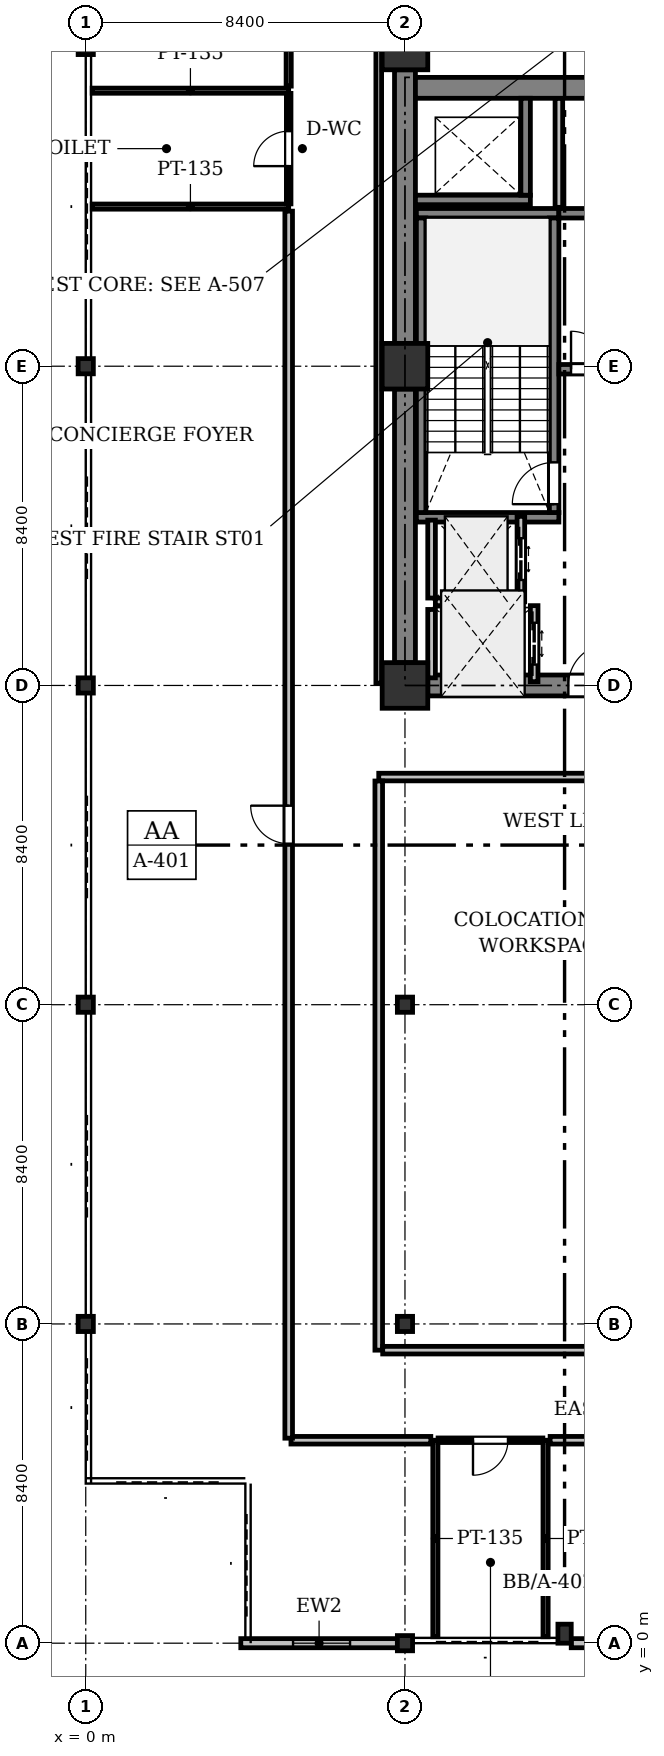
"""IFC4 building model, lengths in metres.
Left out: names, types, materials, properties, quantities, classifications, styles, units other than length and angle.
Written with IfcOpenShell. Run it as: python <this file> out.ifc"""

import sys

from ifc_helpers import new_model, si_unit, direction, frame, frame_2d, origin, origin_2d, place, context, subcontext, project, spatial, rectangle, i_section, extrude, element, fill, save


model = new_model("IFC4")
c1 = context("Model", 3, precision=1e-05, world=origin(), true_north=direction((0.0, 1.0)))
c2 = subcontext(c1, "Body", "Model", "MODEL_VIEW")
j1 = project(units=[si_unit("LENGTHUNIT", "METRE"), si_unit("PLANEANGLEUNIT", "RADIAN")], contexts=[c1])
p1 = place(None, origin())
s1 = spatial("IfcSite", under=j1, at=p1, CompositionType="ELEMENT")
p2 = place(p1, origin())
s2 = spatial("IfcBuilding", under=s1, at=p2, CompositionType="ELEMENT")
p3 = place(p2, frame((0.0, 0.0, 113.1)))
s3 = spatial("IfcBuildingStorey", under=s2, at=p3, CompositionType="ELEMENT", Elevation=113.1)
for number, where, z_axis, x_axis in (
    (1, (0.0, 8.4, 0.0), (0.0, 0.0, 1.0), (1.0, 0.0, 0.0)),
    (2, (0.0, 16.8, 0.0), (0.0, 0.0, 1.0), (1.0, 0.0, 0.0)),
    (3, (0.0, 25.2, 0.0), (0.0, 0.0, 1.0), (1.0, 0.0, 0.0)),
    (4, (0.0, 33.6, 0.0), (0.0, 0.0, 1.0), (1.0, 0.0, 0.0)),
    (5, (0.0, 42.0, 0.0), (0.0, 0.0, 1.0), (1.0, 0.0, 0.0)),
    (6, (8.4, 0.0, 0.0), (0.0, 0.0, 1.0), (1.0, 0.0, 0.0)),
    (7, (8.4, 8.4, 0.0), (0.0, 0.0, 1.0), (1.0, 0.0, 0.0)),
    (8, (8.4, 16.8, 0.0), (0.0, 0.0, 1.0), (1.0, 0.0, 0.0)),
):
    element("IfcColumn", number, at=place(p3, frame(where, z_axis=z_axis, x_axis=x_axis)), inside=s3, PredefinedType="COLUMN", context=c2, shape_type="SweptSolid", body=[
        extrude(i_section(OverallWidth=0.4, OverallDepth=0.4, WebThickness=0.025, FlangeThickness=0.04, at=origin_2d()), origin(), (0.0, 0.0, 1.0), 4.1),
    ])
for number, where, z_axis, x_axis in (
    (9, (8.4, 25.2, 0.0), (0.0, 0.0, 1.0), (1.0, 0.0, 0.0)),
    (10, (8.4, 33.6, 0.0), (0.0, 0.0, 1.0), (1.0, 0.0, 0.0)),
    (11, (8.4, 42.0, 0.0), (0.0, 0.0, 1.0), (1.0, 0.0, 0.0)),
):
    element("IfcColumn", number, at=place(p3, frame(where, z_axis=z_axis, x_axis=x_axis)), inside=s3, PredefinedType="COLUMN", context=c2, shape_type="SweptSolid", body=[
        extrude(rectangle(XDim=1.2, YDim=1.2, at=origin_2d()), origin(), (0.0, 0.0, 1.0), 4.1),
    ])
p4 = place(p3, frame((12.6, 0.25, 0.0), z_axis=(0.0, 0.0, 1.0), x_axis=(1.0, 0.0, 0.0)))
e12 = element("IfcColumn", 12, at=p4, inside=s3, PredefinedType="PILASTER", context=c2, shape_type="SweptSolid", body=[
    extrude(rectangle(XDim=0.35, YDim=0.5, at=origin_2d()), origin(), (0.0, 0.0, 1.0), 4.1),
])
p5 = place(p3, frame((16.6, 0.0, 0.0), z_axis=(0.0, 0.0, 1.0), x_axis=(-1.0, 0.0, 0.0)))
e13 = element("IfcWall", 13, at=p5, inside=s3, PredefinedType="STANDARD", context=c2, shape_type="SweptSolid", body=[
    extrude(rectangle(XDim=3.825, YDim=0.24, at=frame_2d((1.913, 0.0))), origin(), (0.0, 0.0, 1.0), 3.422),
])
p6 = place(p5, frame((1.163, 0.0, 0.9)))
e14 = element("IfcOpeningElement", 14, at=p6, cuts=e13, PredefinedType="OPENING", context=c2, shape_type="SweptSolid", body=[
    extrude(rectangle(XDim=1.5, YDim=1.6, at=frame_2d((0.75, 0.8))), frame((0.0, 0.13, 0.0), z_axis=(0.0, -1.0, 0.0), x_axis=(1.0, 0.0, 0.0)), (0.0, 0.0, 1.0), 0.26),
])
p7 = place(p3, frame((8.2, 0.0, 0.0), z_axis=(0.0, 0.0, 1.0), x_axis=(-1.0, 0.0, 0.0)))
e15 = element("IfcWall", 15, at=p7, inside=s3, PredefinedType="STANDARD", context=c2, shape_type="SweptSolid", body=[
    extrude(rectangle(XDim=4.12, YDim=0.24, at=frame_2d((2.06, 0.0))), origin(), (0.0, 0.0, 1.0), 3.825),
])
p8 = place(p7, frame((1.245, 0.0, 0.9)))
e16 = element("IfcOpeningElement", 16, at=p8, cuts=e15, PredefinedType="OPENING", context=c2, shape_type="SweptSolid", body=[
    extrude(rectangle(XDim=1.5, YDim=1.6, at=frame_2d((0.75, 0.8))), frame((0.0, 0.13, 0.0), z_axis=(0.0, -1.0, 0.0), x_axis=(1.0, 0.0, 0.0)), (0.0, 0.0, 1.0), 0.26),
])
for number, where, z_axis, x_axis in (
    (17, (8.4, 25.8, 0.0), (0.0, 0.0, 1.0), (0.0, 1.0, 0.0)),
    (18, (8.4, 34.2, 0.0), (0.0, 0.0, 1.0), (0.0, 1.0, 0.0)),
):
    element("IfcWall", number, at=place(p3, frame(where, z_axis=z_axis, x_axis=x_axis)), inside=s3, PredefinedType="SHEAR", context=c2, shape_type="SweptSolid", body=[
        extrude(rectangle(XDim=7.2, YDim=0.55, at=frame_2d((3.6, 0.0))), origin(), (0.0, 0.0, 1.0), 3.825),
    ])
p9 = place(p3, frame((8.675, 40.925, 0.0), z_axis=(0.0, 0.0, 1.0), x_axis=(1.0, 0.0, 0.0)))
e19 = element("IfcWall", 19, at=p9, inside=s3, PredefinedType="SHEAR", context=c2, shape_type="SweptSolid", body=[
    extrude(rectangle(XDim=7.85, YDim=0.55, at=frame_2d((3.925, 0.0))), origin(), (0.0, 0.0, 1.0), 3.825),
])
p10 = place(p3, frame((9.0, 25.2, 0.0), z_axis=(0.0, 0.0, 1.0), x_axis=(1.0, 0.0, 0.0)))
e20 = element("IfcWall", 20, at=p10, inside=s3, PredefinedType="SHEAR", context=c2, shape_type="SweptSolid", body=[
    extrude(rectangle(XDim=7.2, YDim=0.55, at=frame_2d((3.6, 0.0))), origin(), (0.0, 0.0, 1.0), 3.825),
])
p11 = place(p10, frame((3.7, 0.0, 0.0)))
e21 = element("IfcOpeningElement", 21, at=p11, cuts=e20, PredefinedType="OPENING", context=c2, shape_type="SweptSolid", body=[
    extrude(rectangle(XDim=1.1, YDim=2.15, at=frame_2d((0.55, 1.075))), frame((0.0, 0.285, 0.0), z_axis=(0.0, -1.0, 0.0), x_axis=(1.0, 0.0, 0.0)), (0.0, 0.0, 1.0), 0.57),
])
for number, where, z_axis, x_axis in (
    (22, (12.45, 29.625, 0.0), (0.0, 0.0, 1.0), (-1.0, 0.0, 0.0)),
    (23, (12.45, 37.625, 0.0), (0.0, 0.0, 1.0), (-1.0, 0.0, 0.0)),
):
    element("IfcWall", number, at=place(p3, frame(where, z_axis=z_axis, x_axis=x_axis)), inside=s3, PredefinedType="SHEAR", context=c2, shape_type="SweptSolid", body=[
        extrude(rectangle(XDim=3.75, YDim=0.25, at=frame_2d((1.875, 0.0))), origin(), (0.0, 0.0, 1.0), 3.825),
    ])
p12 = place(p3, frame((12.325, 29.75, 0.0), z_axis=(0.0, 0.0, 1.0), x_axis=(0.0, 1.0, 0.0)))
e24 = element("IfcWall", 24, at=p12, inside=s3, PredefinedType="SHEAR", context=c2, shape_type="SweptSolid", body=[
    extrude(rectangle(XDim=7.75, YDim=0.25, at=frame_2d((3.875, 0.0))), origin(), (0.0, 0.0, 1.0), 3.825),
])
p13 = place(p12, frame((0.22, 0.0, 0.0)))
e25 = element("IfcOpeningElement", 25, at=p13, cuts=e24, PredefinedType="OPENING", context=c2, shape_type="SweptSolid", body=[
    extrude(rectangle(XDim=1.1, YDim=2.15, at=frame_2d((0.55, 1.075))), frame((0.0, 0.135, 0.0), z_axis=(0.0, -1.0, 0.0), x_axis=(1.0, 0.0, 0.0)), (0.0, 0.0, 1.0), 0.27),
])
p14 = place(p3, frame((8.825, 29.75, 0.0), z_axis=(0.0, 0.0, 1.0), x_axis=(0.0, 1.0, 0.0)))
e26 = element("IfcWall", 26, at=p14, inside=s3, PredefinedType="SHEAR", context=c2, shape_type="SweptSolid", body=[
    extrude(rectangle(XDim=7.75, YDim=0.25, at=frame_2d((3.875, 0.0))), origin(), (0.0, 0.0, 1.0), 3.825),
])
p15 = place(p3, frame((8.675, 37.975, 0.0), z_axis=(0.0, 0.0, 1.0), x_axis=(1.0, 0.0, 0.0)))
e27 = element("IfcWall", 27, at=p15, inside=s3, PredefinedType="SHEAR", context=c2, shape_type="SweptSolid", body=[
    extrude(rectangle(XDim=3.025, YDim=0.25, at=frame_2d((1.512, 0.0))), origin(), (0.0, 0.0, 1.0), 3.825),
])
p16 = place(p3, frame((11.575, 38.1, 0.0), z_axis=(0.0, 0.0, 1.0), x_axis=(0.0, 1.0, 0.0)))
e28 = element("IfcWall", 28, at=p16, inside=s3, PredefinedType="SHEAR", context=c2, shape_type="SweptSolid", body=[
    extrude(rectangle(XDim=2.55, YDim=0.25, at=frame_2d((1.275, 0.0))), origin(), (0.0, 0.0, 1.0), 3.825),
])
p17 = place(p3, frame((12.45, 33.52, 0.0), z_axis=(0.0, 0.0, 1.0), x_axis=(1.0, 0.0, 0.0)))
e29 = element("IfcWall", 29, at=p17, inside=s3, PredefinedType="SHEAR", context=c2, shape_type="SweptSolid", body=[
    extrude(rectangle(XDim=3.75, YDim=0.25, at=frame_2d((1.875, 0.0))), origin(), (0.0, 0.0, 1.0), 3.825),
])
p18 = place(p17, frame((0.32, 0.0, 0.0)))
e30 = element("IfcOpeningElement", 30, at=p18, cuts=e29, PredefinedType="OPENING", context=c2, shape_type="SweptSolid", body=[
    extrude(rectangle(XDim=1.0, YDim=2.15, at=frame_2d((0.5, 1.075))), frame((0.0, 0.135, 0.0), z_axis=(0.0, -1.0, 0.0), x_axis=(1.0, 0.0, 0.0)), (0.0, 0.0, 1.0), 0.27),
])
p19 = place(p3, frame((12.45, 37.625, 0.0), z_axis=(0.0, 0.0, 1.0), x_axis=(1.0, 0.0, 0.0)))
e31 = element("IfcWall", 31, at=p19, inside=s3, PredefinedType="SHEAR", context=c2, shape_type="SweptSolid", body=[
    extrude(rectangle(XDim=4.075, YDim=0.25, at=frame_2d((2.038, 0.0))), origin(), (0.0, 0.0, 1.0), 3.825),
])
p20 = place(p19, frame((1.613, 0.0, 0.0)))
e32 = element("IfcOpeningElement", 32, at=p20, cuts=e31, PredefinedType="OPENING", context=c2, shape_type="SweptSolid", body=[
    extrude(rectangle(XDim=0.85, YDim=2.15, at=frame_2d((0.425, 1.075))), frame((0.0, 0.135, 0.0), z_axis=(0.0, -1.0, 0.0), x_axis=(1.0, 0.0, 0.0)), (0.0, 0.0, 1.0), 0.27),
])
p21 = place(p3, frame((11.45, 27.4, 0.0), z_axis=(0.0, 0.0, 1.0), x_axis=(0.0, 1.0, 0.0)))
e33 = element("IfcWall", 33, at=p21, inside=s3, PredefinedType="PARTITIONING", context=c2, shape_type="SweptSolid", body=[
    extrude(rectangle(XDim=2.25, YDim=0.2, at=frame_2d((1.125, 0.0))), origin(), (0.0, 0.0, 1.0), 3.825),
])
p22 = place(p21, frame((0.575, 0.0, 0.0)))
e34 = element("IfcOpeningElement", 34, at=p22, cuts=e33, PredefinedType="OPENING", context=c2, shape_type="SweptSolid", body=[
    extrude(rectangle(XDim=1.1, YDim=2.2, at=frame_2d((0.55, 1.1))), frame((0.0, 0.11, 0.0), z_axis=(0.0, -1.0, 0.0), x_axis=(1.0, 0.0, 0.0)), (0.0, 0.0, 1.0), 0.22),
])
p23 = place(p3, frame((9.1, 27.5, 0.0), z_axis=(0.0, 0.0, 1.0), x_axis=(0.0, 1.0, 0.0)))
e35 = element("IfcWall", 35, at=p23, inside=s3, PredefinedType="PARTITIONING", context=c2, shape_type="SweptSolid", body=[
    extrude(rectangle(XDim=2.05, YDim=0.2, at=frame_2d((1.025, 0.0))), origin(), (0.0, 0.0, 1.0), 3.825),
])
p24 = place(p3, frame((9.2, 27.4, 0.0), z_axis=(0.0, 0.0, 1.0), x_axis=(1.0, 0.0, 0.0)))
e36 = element("IfcWall", 36, at=p24, inside=s3, PredefinedType="PARTITIONING", context=c2, shape_type="SweptSolid", body=[
    extrude(rectangle(XDim=2.15, YDim=0.2, at=frame_2d((1.075, 0.0))), origin(), (0.0, 0.0, 1.0), 3.825),
])
p25 = place(p3, frame((11.8, 25.3, 0.0), z_axis=(0.0, 0.0, 1.0), x_axis=(0.0, 1.0, 0.0)))
e37 = element("IfcWall", 37, at=p25, inside=s3, PredefinedType="PARTITIONING", context=c2, shape_type="SweptSolid", body=[
    extrude(rectangle(XDim=2.0, YDim=0.2, at=frame_2d((1.0, 0.0))), origin(), (0.0, 0.0, 1.0), 3.825),
])
p26 = place(p25, frame((0.45, 0.0, 0.0)))
e38 = element("IfcOpeningElement", 38, at=p26, cuts=e37, PredefinedType="OPENING", context=c2, shape_type="SweptSolid", body=[
    extrude(rectangle(XDim=1.1, YDim=2.2, at=frame_2d((0.55, 1.1))), frame((0.0, 0.11, 0.0), z_axis=(0.0, -1.0, 0.0), x_axis=(1.0, 0.0, 0.0)), (0.0, 0.0, 1.0), 0.22),
])
p27 = place(p3, frame((9.1, 25.4, 0.0), z_axis=(0.0, 0.0, 1.0), x_axis=(0.0, 1.0, 0.0)))
e39 = element("IfcWall", 39, at=p27, inside=s3, PredefinedType="PARTITIONING", context=c2, shape_type="SweptSolid", body=[
    extrude(rectangle(XDim=1.8, YDim=0.2, at=frame_2d((0.9, 0.0))), origin(), (0.0, 0.0, 1.0), 3.825),
])
p28 = place(p3, frame((12.45, 40.646, 0.0), z_axis=(0.0, 0.0, 1.0), x_axis=(0.0, -1.0, 0.0)))
e40 = element("IfcWall", 40, at=p28, inside=s3, PredefinedType="PARTITIONING", context=c2, shape_type="SweptSolid", body=[
    extrude(rectangle(XDim=2.866, YDim=0.2, at=frame_2d((1.433, 0.0))), origin(), (0.0, 0.0, 1.0), 2.725),
])
for number, where, z_axis, x_axis in (
    (41, (5.34, 40.85, 0.0), (0.0, 0.0, 1.0), (-1.0, 0.0, 0.0)),
    (42, (0.169, 37.8, 0.0), (0.0, 0.0, 1.0), (1.0, 0.0, 0.0)),
):
    element("IfcWall", number, at=place(p3, frame(where, z_axis=z_axis, x_axis=x_axis)), inside=s3, PredefinedType="PARTITIONING", context=c2, shape_type="SweptSolid", body=[
        extrude(rectangle(XDim=5.171, YDim=0.135, at=frame_2d((2.585, 0.0))), origin(), (0.0, 0.0, 1.0), 3.469),
    ])
p29 = place(p3, frame((5.34, 37.872, 0.0), z_axis=(0.0, 0.0, 1.0), x_axis=(0.0, 1.0, 0.0)))
e43 = element("IfcWall", 43, at=p29, inside=s3, PredefinedType="PARTITIONING", context=c2, shape_type="SweptSolid", body=[
    extrude(rectangle(XDim=2.907, YDim=0.12, at=frame_2d((1.454, 0.0))), origin(), (0.0, 0.0, 1.0), 3.825),
])
p30 = place(p29, frame((0.993, 0.0, 0.0)))
e44 = element("IfcOpeningElement", 44, at=p30, cuts=e43, PredefinedType="OPENING", context=c2, shape_type="SweptSolid", body=[
    extrude(rectangle(XDim=0.92, YDim=2.1, at=frame_2d((0.46, 1.05))), frame((0.0, 0.07, 0.0), z_axis=(0.0, -1.0, 0.0), x_axis=(1.0, 0.0, 0.0)), (0.0, 0.0, 1.0), 0.14),
])
for number, where, z_axis, x_axis in (
    (45, (9.2, 5.34, 0.0), (0.0, 0.0, 1.0), (0.0, -1.0, 0.0)),
    (46, (12.1, 0.169, 0.0), (0.0, 0.0, 1.0), (0.0, 1.0, 0.0)),
):
    element("IfcWall", number, at=place(p3, frame(where, z_axis=z_axis, x_axis=x_axis)), inside=s3, PredefinedType="PARTITIONING", context=c2, shape_type="SweptSolid", body=[
        extrude(rectangle(XDim=5.171, YDim=0.135, at=frame_2d((2.585, 0.0))), origin(), (0.0, 0.0, 1.0), 3.825),
    ])
p31 = place(p3, frame((12.029, 5.34, 0.0), z_axis=(0.0, 0.0, 1.0), x_axis=(-1.0, 0.0, 0.0)))
e47 = element("IfcWall", 47, at=p31, inside=s3, PredefinedType="PARTITIONING", context=c2, shape_type="SweptSolid", body=[
    extrude(rectangle(XDim=2.757, YDim=0.12, at=frame_2d((1.378, 0.0))), origin(), (0.0, 0.0, 1.0), 3.825),
])
p32 = place(p31, frame((0.918, 0.0, 0.0)))
e48 = element("IfcOpeningElement", 48, at=p32, cuts=e47, PredefinedType="OPENING", context=c2, shape_type="SweptSolid", body=[
    extrude(rectangle(XDim=0.92, YDim=2.1, at=frame_2d((0.46, 1.05))), frame((0.0, 0.07, 0.0), z_axis=(0.0, -1.0, 0.0), x_axis=(1.0, 0.0, 0.0)), (0.0, 0.0, 1.0), 0.14),
])
p33 = place(p3, frame((5.34, 40.97, 0.0), z_axis=(0.0, 0.0, 1.0), x_axis=(0.0, 1.0, 0.0)))
e49 = element("IfcWall", 49, at=p33, inside=s3, PredefinedType="PARTITIONING", context=c2, shape_type="SweptSolid", body=[
    extrude(rectangle(XDim=4.23, YDim=0.135, at=frame_2d((2.115, 0.0))), origin(), (0.0, 0.0, 1.0), 3.292),
])
p34 = place(p3, frame((7.71, 45.2, 0.0), z_axis=(0.0, 0.0, 1.0), x_axis=(0.0, -1.0, 0.0)))
e50 = element("IfcWall", 50, at=p34, inside=s3, PredefinedType="PARTITIONING", context=c2, shape_type="SweptSolid", body=[
    extrude(rectangle(XDim=19.94, YDim=0.15, at=frame_2d((9.97, 0.0))), origin(), (0.0, 0.0, 1.0), 3.292),
])
p35 = place(p3, frame((34.236, 22.79, 0.0), z_axis=(0.0, 0.0, 1.0), x_axis=(-1.0, 0.0, 0.0)))
e51 = element("IfcWall", 51, at=p35, inside=s3, PredefinedType="PARTITIONING", context=c2, shape_type="SweptSolid", body=[
    extrude(rectangle(XDim=26.526, YDim=0.2, at=frame_2d((13.263, 0.0))), origin(), (0.0, 0.0, 1.0), 3.297),
])
p36 = place(p35, frame((12.763, 0.0, 0.0)))
e52 = element("IfcOpeningElement", 52, at=p36, cuts=e51, PredefinedType="OPENING", context=c2, shape_type="SweptSolid", body=[
    extrude(rectangle(XDim=1.0, YDim=2.15, at=frame_2d((0.5, 1.075))), frame((0.0, 0.11, 0.0), z_axis=(0.0, -1.0, 0.0), x_axis=(1.0, 0.0, 0.0)), (0.0, 0.0, 1.0), 0.22),
])
p37 = place(p3, frame((7.71, 22.686, 0.0), z_axis=(0.0, 0.0, 1.0), x_axis=(0.0, -1.0, 0.0)))
e53 = element("IfcWall", 53, at=p37, inside=s3, PredefinedType="PARTITIONING", context=c2, shape_type="SweptSolid", body=[
    extrude(rectangle(XDim=14.976, YDim=0.2, at=frame_2d((7.488, 0.0))), origin(), (0.0, 0.0, 1.0), 3.292),
])
p38 = place(p3, frame((7.814, 7.71, 0.0), z_axis=(0.0, 0.0, 1.0), x_axis=(1.0, 0.0, 0.0)))
e54 = element("IfcWall", 54, at=p38, inside=s3, PredefinedType="PARTITIONING", context=c2, shape_type="SweptSolid", body=[
    extrude(rectangle(XDim=6.526, YDim=0.2, at=frame_2d((3.263, 0.0))), origin(), (0.0, 0.0, 1.0), 3.297),
])
p39 = place(p3, frame((9.08, 5.34, 0.0), z_axis=(0.0, 0.0, 1.0), x_axis=(-1.0, 0.0, 0.0)))
e55 = element("IfcWall", 55, at=p39, inside=s3, PredefinedType="PARTITIONING", context=c2, shape_type="SweptSolid", body=[
    extrude(rectangle(XDim=3.68, YDim=0.2, at=frame_2d((1.84, 0.0))), origin(), (0.0, 0.0, 1.0), 3.297),
])
p40 = place(p3, frame((5.34, 5.394, 0.0), z_axis=(0.0, 0.0, 1.0), x_axis=(-7.561837e-06, 0.999999999971, 0.0)))
e56 = element("IfcWall", 56, at=p40, inside=s3, PredefinedType="PARTITIONING", context=c2, shape_type="SweptSolid", body=[
    extrude(rectangle(XDim=32.286, YDim=0.2, at=frame_2d((16.143, 0.0))), origin(), (0.0, 0.0, 1.0), 3.292),
])
p41 = place(p40, frame((15.643, 0.0, 0.0)))
e57 = element("IfcOpeningElement", 57, at=p41, cuts=e56, PredefinedType="OPENING", context=c2, shape_type="SweptSolid", body=[
    extrude(rectangle(XDim=1.0, YDim=2.15, at=frame_2d((0.5, 1.075))), frame((0.0, 0.11, 0.0), z_axis=(0.0, -1.0, 0.0), x_axis=(1.0, 0.0, 0.0)), (0.0, 0.0, 1.0), 0.22),
])
p42 = place(p3, frame((36.65, 5.34, 0.0), z_axis=(0.0, 0.0, 1.0), x_axis=(-1.0, 0.0, 0.0)))
e58 = element("IfcWall", 58, at=p42, inside=s3, PredefinedType="PARTITIONING", context=c2, shape_type="SweptSolid", body=[
    extrude(rectangle(XDim=24.43, YDim=0.2, at=frame_2d((12.215, 0.0))), origin(), (0.0, 0.0, 1.0), 3.297),
])
p43 = place(p42, frame((11.715, 0.0, 0.0)))
e59 = element("IfcOpeningElement", 59, at=p43, cuts=e58, PredefinedType="OPENING", context=c2, shape_type="SweptSolid", body=[
    extrude(rectangle(XDim=1.0, YDim=2.15, at=frame_2d((0.5, 1.075))), frame((0.0, 0.11, 0.0), z_axis=(0.0, -1.0, 0.0), x_axis=(1.0, 0.0, 0.0)), (0.0, 0.0, 1.0), 0.22),
])
p44 = place(p8, origin())
e60 = element("IfcWindow", 60, at=p44, inside=s3, PartitioningType="SINGLE_PANEL", PredefinedType="WINDOW", context=c2, shape_type="SweptSolid", body=[
    extrude(rectangle(XDim=1.5, YDim=1.6, at=frame_2d((0.75, 0.8))), frame((0.0, 0.03, 0.0), z_axis=(0.0, -1.0, 0.0), x_axis=(1.0, 0.0, 0.0)), (0.0, 0.0, 1.0), 0.06),
])
fill(e16, e60)
p45 = place(p11, origin())
e61 = element("IfcDoor", 61, at=p45, inside=s3, OperationType="SINGLE_SWING_RIGHT", PredefinedType="DOOR", context=c2, shape_type="SweptSolid", body=[
    extrude(rectangle(XDim=1.1, YDim=2.15, at=frame_2d((0.55, 1.075))), frame((0.0, 0.025, 0.0), z_axis=(0.0, -1.0, 0.0), x_axis=(1.0, 0.0, 0.0)), (0.0, 0.0, 1.0), 0.05),
])
fill(e21, e61)
p46 = place(p13, origin())
e62 = element("IfcDoor", 62, at=p46, inside=s3, OperationType="SINGLE_SWING_LEFT", PredefinedType="DOOR", context=c2, shape_type="SweptSolid", body=[
    extrude(rectangle(XDim=1.1, YDim=2.15, at=frame_2d((0.55, 1.075))), frame((0.0, 0.025, 0.0), z_axis=(0.0, -1.0, 0.0), x_axis=(1.0, 0.0, 0.0)), (0.0, 0.0, 1.0), 0.05),
])
fill(e25, e62)
p47 = place(p18, origin())
e63 = element("IfcDoor", 63, at=p47, inside=s3, OperationType="SINGLE_SWING_LEFT", PredefinedType="DOOR", context=c2, shape_type="SweptSolid", body=[
    extrude(rectangle(XDim=1.0, YDim=2.15, at=frame_2d((0.5, 1.075))), frame((0.0, 0.025, 0.0), z_axis=(0.0, -1.0, 0.0), x_axis=(1.0, 0.0, 0.0)), (0.0, 0.0, 1.0), 0.05),
])
fill(e30, e63)
p48 = place(p22, origin())
e64 = element("IfcDoor", 64, at=p48, inside=s3, OperationType="DOUBLE_DOOR_SLIDING", PredefinedType="DOOR", context=c2, shape_type="SweptSolid", body=[
    extrude(rectangle(XDim=1.1, YDim=2.2, at=frame_2d((0.55, 1.1))), frame((0.0, 0.025, 0.0), z_axis=(0.0, -1.0, 0.0), x_axis=(1.0, 0.0, 0.0)), (0.0, 0.0, 1.0), 0.05),
])
fill(e34, e64)
p49 = place(p26, origin())
e65 = element("IfcDoor", 65, at=p49, inside=s3, OperationType="DOUBLE_DOOR_SLIDING", PredefinedType="DOOR", context=c2, shape_type="SweptSolid", body=[
    extrude(rectangle(XDim=1.1, YDim=2.2, at=frame_2d((0.55, 1.1))), frame((0.0, 0.025, 0.0), z_axis=(0.0, -1.0, 0.0), x_axis=(1.0, 0.0, 0.0)), (0.0, 0.0, 1.0), 0.05),
])
fill(e38, e65)
p50 = place(p30, origin())
e66 = element("IfcDoor", 66, at=p50, inside=s3, OperationType="SINGLE_SWING_LEFT", PredefinedType="DOOR", context=c2, shape_type="SweptSolid", body=[
    extrude(rectangle(XDim=0.92, YDim=2.1, at=frame_2d((0.46, 1.05))), frame((0.0, 0.025, 0.0), z_axis=(0.0, -1.0, 0.0), x_axis=(1.0, 0.0, 0.0)), (0.0, 0.0, 1.0), 0.05),
])
fill(e44, e66)
p51 = place(p32, origin())
e67 = element("IfcDoor", 67, at=p51, inside=s3, OperationType="SINGLE_SWING_RIGHT", PredefinedType="DOOR", context=c2, shape_type="SweptSolid", body=[
    extrude(rectangle(XDim=0.92, YDim=2.1, at=frame_2d((0.46, 1.05))), frame((0.0, 0.025, 0.0), z_axis=(0.0, -1.0, 0.0), x_axis=(1.0, 0.0, 0.0)), (0.0, 0.0, 1.0), 0.05),
])
fill(e48, e67)
p52 = place(p41, origin())
e68 = element("IfcDoor", 68, at=p52, inside=s3, OperationType="SINGLE_SWING_RIGHT", PredefinedType="DOOR", context=c2, shape_type="SweptSolid", body=[
    extrude(rectangle(XDim=1.0, YDim=2.15, at=frame_2d((0.5, 1.075))), frame((0.0, 0.025, 0.0), z_axis=(0.0, -1.0, 0.0), x_axis=(1.0, 0.0, 0.0)), (0.0, 0.0, 1.0), 0.05),
])
fill(e57, e68)
save(model, sys.argv[1])
